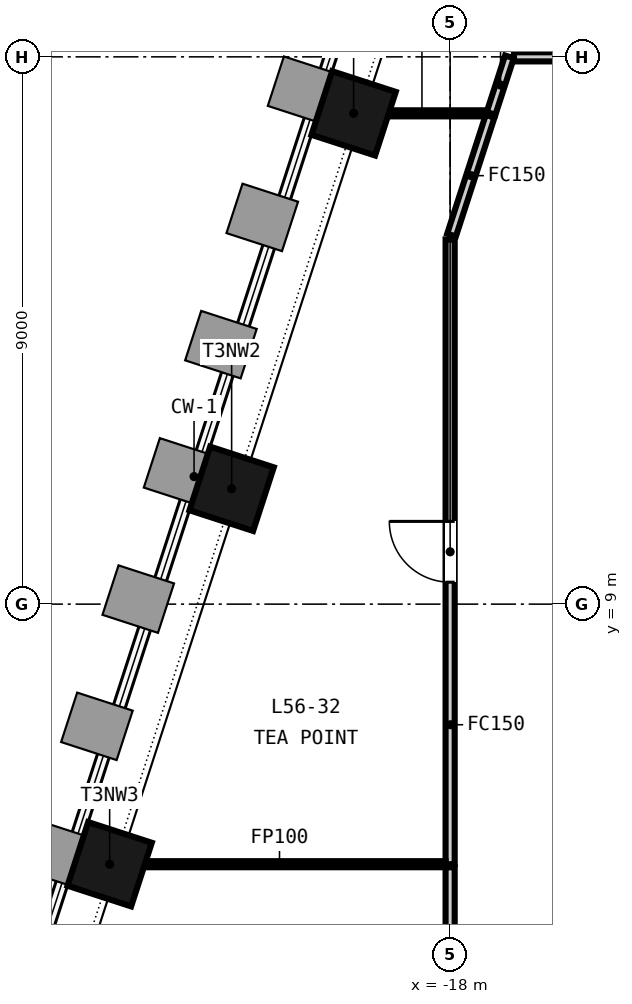
"""IFC4 building model, lengths in metres.
Left out: names, types, materials, properties, quantities, classifications, styles, units other than length and angle.
Written with IfcOpenShell. Run it as: python <this file> out.ifc"""

import sys

from ifc_helpers import new_model, si_unit, direction, frame, frame_2d, origin, origin_2d, place, context, subcontext, project, spatial, rectangle, extrude, element, fill, save


model = new_model("IFC4")
c1 = context("Model", 3, precision=1e-05, world=origin(), true_north=direction((0.0, 1.0)))
c2 = subcontext(c1, "Body", "Model", "MODEL_VIEW")
j1 = project(units=[si_unit("LENGTHUNIT", "METRE"), si_unit("PLANEANGLEUNIT", "RADIAN")], contexts=[c1])
p1 = place(None, origin())
s1 = spatial("IfcSite", under=j1, at=p1, CompositionType="ELEMENT")
p2 = place(p1, origin())
s2 = spatial("IfcBuilding", under=s1, at=p2, CompositionType="ELEMENT")
p3 = place(p2, frame((0.0, 0.0, 223.6)))
s3 = spatial("IfcBuildingStorey", under=s2, at=p3, CompositionType="ELEMENT", Elevation=223.6)
for number, where, z_axis, x_axis in (
    (1, (-19.587, 17.071, -0.15), (0.0, 0.0, 1.0), (-0.309, -0.951, 0.0)),
    (2, (-21.593, 10.897, -0.15), (0.0, 0.0, 1.0), (-0.309, -0.951, 0.0)),
    (3, (-23.599, 4.723, -0.15), (0.0, 0.0, 1.0), (-0.309, -0.951, 0.0)),
):
    element("IfcColumn", number, at=place(p3, frame(where, z_axis=z_axis, x_axis=x_axis)), inside=s3, PredefinedType="COLUMN", context=c2, shape_type="SweptSolid", body=[
        extrude(rectangle(XDim=1.1, YDim=1.1, at=origin_2d()), origin(), (0.0, 0.0, 1.0), 3.65),
    ])
p4 = place(p3, frame((-17.327, 17.071, 0.0), z_axis=(0.0, 0.0, 1.0), x_axis=(0.309170843074, 0.951006514064, 0.0)))
e4 = element("IfcWall", 4, at=p4, inside=s3, PredefinedType="PARTITIONING", context=c2, shape_type="SweptSolid", body=[
    extrude(rectangle(XDim=0.977, YDim=0.15, at=frame_2d((0.488, 0.0))), origin(), (0.0, 0.0, 1.0), 2.75),
])
p5 = place(p3, frame((-16.95, 18.0, 0.0), z_axis=(0.0, 0.0, 1.0), x_axis=(1.0, 0.0, 0.0)))
e5 = element("IfcWall", 5, at=p5, inside=s3, PredefinedType="PARTITIONING", context=c2, shape_type="SweptSolid", body=[
    extrude(rectangle(XDim=6.85, YDim=0.15, at=frame_2d((3.425, 0.0))), origin(), (0.0, 0.0, 1.0), 2.75),
])
p6 = place(p5, frame((2.925, 0.0, 0.0)))
e6 = element("IfcOpeningElement", 6, at=p6, cuts=e5, PredefinedType="OPENING", context=c2, shape_type="SweptSolid", body=[
    extrude(rectangle(XDim=1.0, YDim=2.1, at=frame_2d((0.5, 1.05))), frame((0.0, 0.085, 0.0), z_axis=(0.0, -1.0, 0.0), x_axis=(1.0, 0.0, 0.0)), (0.0, 0.0, 1.0), 0.17),
])
p7 = place(p3, frame((-19.535, 17.071, 0.0), z_axis=(0.0, 0.0, 1.0), x_axis=(1.0, 0.0, 0.0)))
e7 = element("IfcWall", 7, at=p7, inside=s3, PredefinedType="PARTITIONING", context=c2, shape_type="SweptSolid", body=[
    extrude(rectangle(XDim=2.133, YDim=0.1, at=frame_2d((1.066, 0.0))), origin(), (0.0, 0.0, 1.0), 2.75),
])
p8 = place(p3, frame((-18.0, 4.723, 0.0), z_axis=(0.0, 0.0, 1.0), x_axis=(0.0, 1.0, 0.0)))
e8 = element("IfcWall", 8, at=p8, inside=s3, PredefinedType="PARTITIONING", context=c2, shape_type="SweptSolid", body=[
    extrude(rectangle(XDim=10.275, YDim=0.15, at=frame_2d((5.138, 0.0))), origin(), (0.0, 0.0, 1.0), 2.75),
])
p9 = place(p8, frame((4.637, 0.0, 0.0)))
e9 = element("IfcOpeningElement", 9, at=p9, cuts=e8, PredefinedType="OPENING", context=c2, shape_type="SweptSolid", body=[
    extrude(rectangle(XDim=1.0, YDim=2.1, at=frame_2d((0.5, 1.05))), frame((0.0, 0.085, 0.0), z_axis=(0.0, -1.0, 0.0), x_axis=(1.0, 0.0, 0.0)), (0.0, 0.0, 1.0), 0.17),
])
p10 = place(p3, frame((-17.977, 15.069, 0.0), z_axis=(0.0, 0.0, 1.0), x_axis=(0.308838863498, 0.951114376084, 0.0)))
e10 = element("IfcWall", 10, at=p10, inside=s3, PredefinedType="PARTITIONING", context=c2, shape_type="SweptSolid", body=[
    extrude(rectangle(XDim=2.054, YDim=0.15, at=frame_2d((1.027, 0.0))), origin(), (0.0, 0.0, 1.0), 2.75),
])
p11 = place(p3, frame((-23.547, 4.723, 0.0), z_axis=(0.0, 0.0, 1.0), x_axis=(1.0, 0.0, 0.0)))
e11 = element("IfcWall", 11, at=p11, inside=s3, PredefinedType="PARTITIONING", context=c2, shape_type="SweptSolid", body=[
    extrude(rectangle(XDim=5.472, YDim=0.1, at=frame_2d((2.736, 0.0))), origin(), (0.0, 0.0, 1.0), 2.75),
])
p12 = place(p3, frame((-18.0, -3.125, 0.0), z_axis=(0.0, 0.0, 1.0), x_axis=(0.0, 1.0, 0.0)))
e12 = element("IfcWall", 12, at=p12, inside=s3, PredefinedType="PARTITIONING", context=c2, shape_type="SweptSolid", body=[
    extrude(rectangle(XDim=7.798, YDim=0.15, at=frame_2d((3.899, 0.0))), origin(), (0.0, 0.0, 1.0), 2.75),
])
p13 = place(p12, frame((2.999, 0.0, 0.0)))
e13 = element("IfcOpeningElement", 13, at=p13, cuts=e12, PredefinedType="OPENING", context=c2, shape_type="SweptSolid", body=[
    extrude(rectangle(XDim=1.8, YDim=2.1, at=frame_2d((0.9, 1.05))), frame((0.0, 0.085, 0.0), z_axis=(0.0, -1.0, 0.0), x_axis=(1.0, 0.0, 0.0)), (0.0, 0.0, 1.0), 0.17),
])
p14 = place(p9, origin())
e14 = element("IfcDoor", 14, at=p14, inside=s3, OperationType="SINGLE_SWING_RIGHT", PredefinedType="DOOR", context=c2, shape_type="SweptSolid", body=[
    extrude(rectangle(XDim=1.0, YDim=2.1, at=frame_2d((0.5, 1.05))), frame((0.0, 0.025, 0.0), z_axis=(0.0, -1.0, 0.0), x_axis=(1.0, 0.0, 0.0)), (0.0, 0.0, 1.0), 0.05),
])
fill(e9, e14)
save(model, sys.argv[1])
